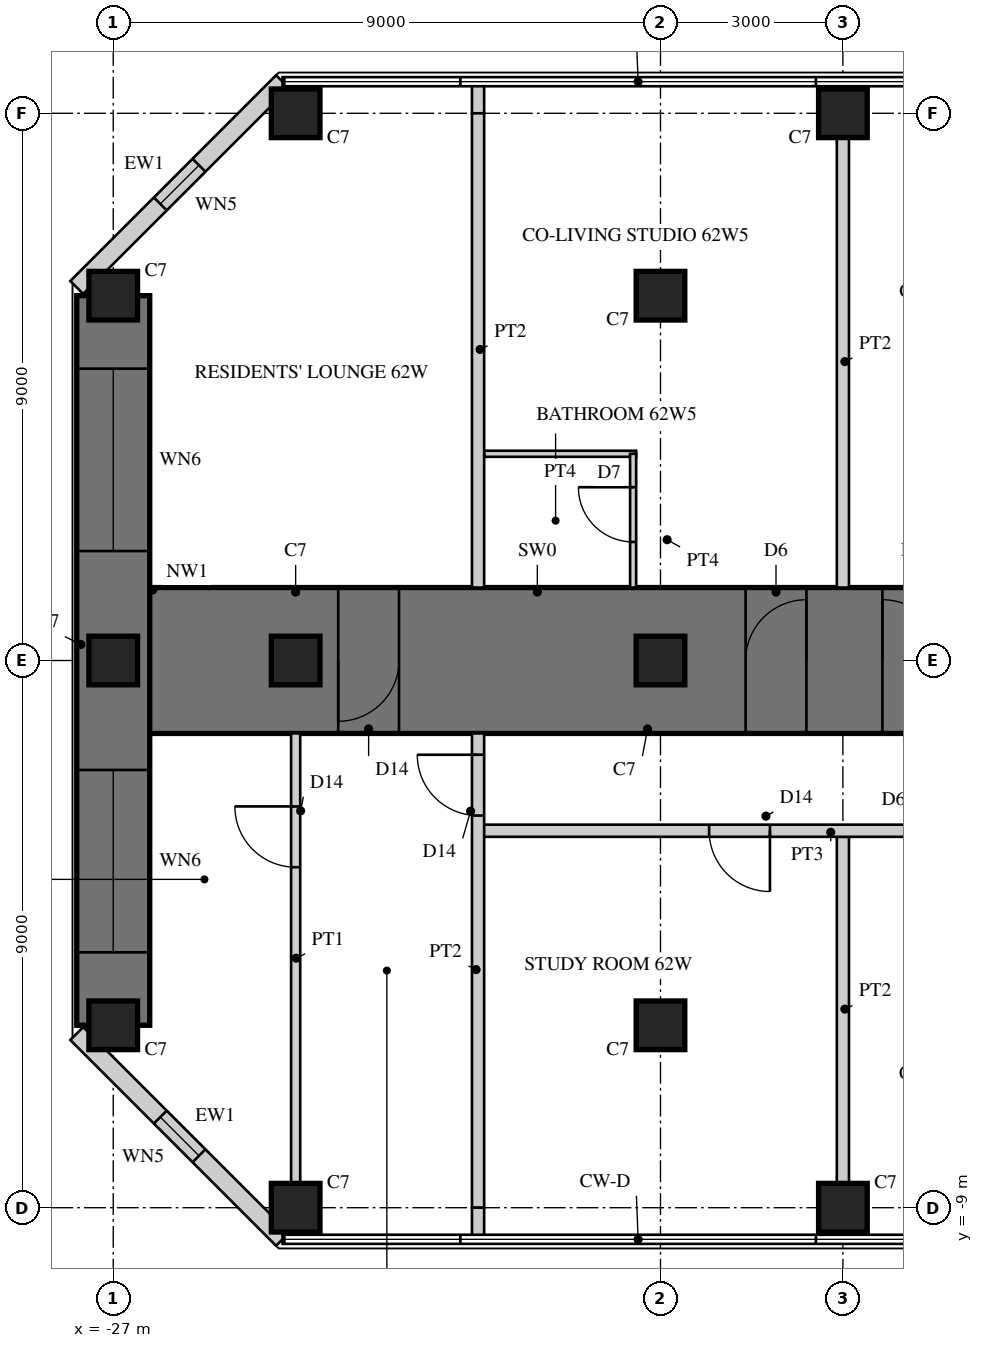
"""IFC4 building model, lengths in metres.
Left out: names, types, materials, properties, quantities, classifications, styles, units other than length and angle.
Written with IfcOpenShell. Run it as: python <this file> out.ifc"""

import sys

from ifc_helpers import new_model, si_unit, direction, frame, frame_2d, origin, origin_2d, place, context, subcontext, project, spatial, rectangle, hollow_rectangle, extrude, element, fill, save


model = new_model("IFC4")
c1 = context("Model", 3, precision=1e-05, world=origin(), true_north=direction((0.0, 1.0)))
c2 = subcontext(c1, "Body", "Model", "MODEL_VIEW")
j1 = project(units=[si_unit("LENGTHUNIT", "METRE"), si_unit("PLANEANGLEUNIT", "RADIAN")], contexts=[c1])
p1 = place(None, origin())
s1 = spatial("IfcSite", under=j1, at=p1, CompositionType="ELEMENT")
p2 = place(p1, origin())
s2 = spatial("IfcBuilding", under=s1, at=p2, CompositionType="ELEMENT")
p3 = place(p2, frame((0.0, 0.0, 242.5)))
s3 = spatial("IfcBuildingStorey", under=s2, at=p3, CompositionType="ELEMENT", Elevation=242.5)
p4 = place(p3, frame((-13.05, 0.0, 0.0), z_axis=(0.0, 0.0, 1.0), x_axis=(-1.0, 0.0, 0.0)))
e1 = element("IfcWall", 1, at=p4, inside=s3, PredefinedType="SHEAR", context=c2, shape_type="SweptSolid", body=[
    extrude(rectangle(XDim=13.95, YDim=2.4, at=frame_2d((6.975, 0.0))), origin(), (0.0, 0.0, 1.0), 3.4),
])
p5 = place(p4, frame((0.3, 0.0, 0.0)))
e2 = element("IfcOpeningElement", 2, at=p5, cuts=e1, PredefinedType="OPENING", context=c2, shape_type="SweptSolid", body=[
    extrude(rectangle(XDim=1.0, YDim=2.15, at=frame_2d((0.5, 1.075))), frame((0.0, 1.21, 0.0), z_axis=(0.0, -1.0, 0.0), x_axis=(1.0, 0.0, 0.0)), (0.0, 0.0, 1.0), 2.42),
])
p6 = place(p4, frame((2.55, 0.0, 0.0)))
e3 = element("IfcOpeningElement", 3, at=p6, cuts=e1, PredefinedType="OPENING", context=c2, shape_type="SweptSolid", body=[
    extrude(rectangle(XDim=1.0, YDim=2.15, at=frame_2d((0.5, 1.075))), frame((0.0, 1.21, 0.0), z_axis=(0.0, -1.0, 0.0), x_axis=(1.0, 0.0, 0.0)), (0.0, 0.0, 1.0), 2.42),
])
p7 = place(p4, frame((9.25, 0.0, 0.0)))
e4 = element("IfcOpeningElement", 4, at=p7, cuts=e1, PredefinedType="OPENING", context=c2, shape_type="SweptSolid", body=[
    extrude(rectangle(XDim=1.0, YDim=2.2, at=frame_2d((0.5, 1.1))), frame((0.0, 1.21, 0.0), z_axis=(0.0, -1.0, 0.0), x_axis=(1.0, 0.0, 0.0)), (0.0, 0.0, 1.0), 2.42),
])
p8 = place(p3, frame((-27.0, 6.0, 0.0), z_axis=(0.0, 0.0, 1.0), x_axis=(0.0, -1.0, 0.0)))
e5 = element("IfcWall", 5, at=p8, inside=s3, PredefinedType="SHEAR", context=c2, shape_type="SweptSolid", body=[
    extrude(rectangle(XDim=12.0, YDim=1.2, at=frame_2d((6.0, 0.0))), origin(), (0.0, 0.0, 1.0), 3.4),
])
p9 = place(p8, frame((1.2, 0.0, 0.6)))
e6 = element("IfcOpeningElement", 6, at=p9, cuts=e5, PredefinedType="OPENING", context=c2, shape_type="SweptSolid", body=[
    extrude(rectangle(XDim=3.0, YDim=2.4, at=frame_2d((1.5, 1.2))), frame((0.0, 0.61, 0.0), z_axis=(0.0, -1.0, 0.0), x_axis=(1.0, 0.0, 0.0)), (0.0, 0.0, 1.0), 1.22),
])
p10 = place(p8, frame((7.8, 0.0, 0.6)))
e7 = element("IfcOpeningElement", 7, at=p10, cuts=e5, PredefinedType="OPENING", context=c2, shape_type="SweptSolid", body=[
    extrude(rectangle(XDim=3.0, YDim=2.4, at=frame_2d((1.5, 1.2))), frame((0.0, 0.61, 0.0), z_axis=(0.0, -1.0, 0.0), x_axis=(1.0, 0.0, 0.0)), (0.0, 0.0, 1.0), 1.22),
])
for number, where, z_axis, x_axis in (
    (8, (-15.0, 9.0, 0.0), (0.0, 0.0, 1.0), (1.0, 0.0, 0.0)),
    (9, (-24.0, 9.0, 0.0), (0.0, 0.0, 1.0), (1.0, 0.0, 0.0)),
    (10, (-15.0, -9.0, 0.0), (0.0, 0.0, 1.0), (1.0, 0.0, 0.0)),
    (11, (-24.0, -9.0, 0.0), (0.0, 0.0, 1.0), (1.0, 0.0, 0.0)),
    (12, (-27.0, 6.0, 0.0), (0.0, 0.0, 1.0), (1.0, 0.0, 0.0)),
    (13, (-27.0, 0.0, 0.0), (0.0, 0.0, 1.0), (1.0, 0.0, 0.0)),
    (14, (-27.0, -6.0, 0.0), (0.0, 0.0, 1.0), (1.0, 0.0, 0.0)),
    (15, (-18.0, 6.0, 0.0), (0.0, 0.0, 1.0), (1.0, 0.0, 0.0)),
    (16, (-18.0, 0.0, 0.0), (0.0, 0.0, 1.0), (1.0, 0.0, 0.0)),
    (17, (-18.0, -6.0, 0.0), (0.0, 0.0, 1.0), (1.0, 0.0, 0.0)),
    (18, (-24.0, 0.0, 0.0), (0.0, 0.0, 1.0), (1.0, 0.0, 0.0)),
):
    element("IfcColumn", number, at=place(p3, frame(where, z_axis=z_axis, x_axis=x_axis)), inside=s3, PredefinedType="COLUMN", context=c2, shape_type="SweptSolid", body=[
        extrude(rectangle(XDim=0.8, YDim=0.8, at=origin_2d()), origin(), (0.0, 0.0, 1.0), 3.4),
    ])
p11 = place(p3, frame((-24.215, 9.52, 0.0), z_axis=(0.0, 0.0, 1.0), x_axis=(-0.707132283189, -0.707081278264, 0.0)))
e19 = element("IfcWall", 19, at=p11, inside=s3, PredefinedType="SOLIDWALL", context=c2, shape_type="SweptSolid", body=[
    extrude(rectangle(XDim=4.787, YDim=0.3, at=frame_2d((2.393, 0.0))), origin(), (0.0, 0.0, 1.0), 3.22),
])
p12 = place(p11, frame((1.943, 0.0, 0.3)))
e20 = element("IfcOpeningElement", 20, at=p12, cuts=e19, PredefinedType="OPENING", context=c2, shape_type="SweptSolid", body=[
    extrude(rectangle(XDim=0.9, YDim=2.4, at=frame_2d((0.45, 1.2))), frame((0.0, 0.16, 0.0), z_axis=(0.0, -1.0, 0.0), x_axis=(1.0, 0.0, 0.0)), (0.0, 0.0, 1.0), 0.32),
])
p13 = place(p3, frame((-27.6, -6.135, 0.0), z_axis=(0.0, 0.0, 1.0), x_axis=(0.707132283189, -0.707081278264, 0.0)))
e21 = element("IfcWall", 21, at=p13, inside=s3, PredefinedType="SOLIDWALL", context=c2, shape_type="SweptSolid", body=[
    extrude(rectangle(XDim=4.787, YDim=0.3, at=frame_2d((2.393, 0.0))), origin(), (0.0, 0.0, 1.0), 3.22),
])
p14 = place(p13, frame((1.943, 0.0, 0.3)))
e22 = element("IfcOpeningElement", 22, at=p14, cuts=e21, PredefinedType="OPENING", context=c2, shape_type="SweptSolid", body=[
    extrude(rectangle(XDim=0.9, YDim=2.4, at=frame_2d((0.45, 1.2))), frame((0.0, 0.16, 0.0), z_axis=(0.0, -1.0, 0.0), x_axis=(1.0, 0.0, 0.0)), (0.0, 0.0, 1.0), 0.32),
])
p15 = place(p3, frame((-15.0, -2.9, 0.0), z_axis=(0.0, 0.0, 1.0), x_axis=(0.0, -1.0, 0.0)))
e23 = element("IfcWall", 23, at=p15, inside=s3, PredefinedType="SOLIDWALL", context=c2, shape_type="SweptSolid", body=[
    extrude(rectangle(XDim=5.7, YDim=0.2, at=frame_2d((2.85, 0.0))), origin(), (0.0, 0.0, 1.0), 2.52),
])
p16 = place(p3, frame((-15.0, 8.6, 0.0), z_axis=(0.0, 0.0, 1.0), x_axis=(0.0, -1.0, 0.0)))
e24 = element("IfcWall", 24, at=p16, inside=s3, PredefinedType="SOLIDWALL", context=c2, shape_type="SweptSolid", body=[
    extrude(rectangle(XDim=7.4, YDim=0.2, at=frame_2d((3.7, 0.0))), origin(), (0.0, 0.0, 1.0), 2.52),
])
p17 = place(p3, frame((-18.4, 3.4, 0.0), z_axis=(0.0, 0.0, 1.0), x_axis=(-1.0, 0.0, 0.0)))
e25 = element("IfcWall", 25, at=p17, inside=s3, PredefinedType="PARTITIONING", context=c2, shape_type="SweptSolid", body=[
    extrude(rectangle(XDim=2.5, YDim=0.1, at=frame_2d((1.25, 0.0))), origin(), (0.0, 0.0, 1.0), 3.22),
])
p18 = place(p3, frame((-18.45, 3.4, 0.0), z_axis=(0.0, 0.0, 1.0), x_axis=(0.0, -1.0, 0.0)))
e26 = element("IfcWall", 26, at=p18, inside=s3, PredefinedType="PARTITIONING", context=c2, shape_type="SweptSolid", body=[
    extrude(rectangle(XDim=2.2, YDim=0.1, at=frame_2d((1.1, 0.0))), origin(), (0.0, 0.0, 1.0), 3.22),
])
p19 = place(p18, frame((0.55, 0.0, 0.0)))
e27 = element("IfcOpeningElement", 27, at=p19, cuts=e26, PredefinedType="OPENING", context=c2, shape_type="SweptSolid", body=[
    extrude(rectangle(XDim=0.9, YDim=2.1, at=frame_2d((0.45, 1.05))), frame((0.0, 0.06, 0.0), z_axis=(0.0, -1.0, 0.0), x_axis=(1.0, 0.0, 0.0)), (0.0, 0.0, 1.0), 0.12),
])
p20 = place(p3, frame((-9.4, -2.8, 0.0), z_axis=(0.0, 0.0, 1.0), x_axis=(-1.0, 0.0, 0.0)))
e28 = element("IfcWall", 28, at=p20, inside=s3, PredefinedType="SOLIDWALL", context=c2, shape_type="SweptSolid", body=[
    extrude(rectangle(XDim=11.6, YDim=0.2, at=frame_2d((5.8, 0.0))), origin(), (0.0, 0.0, 1.0), 3.22),
])
p21 = place(p20, frame((3.4, 0.0, 0.0)))
e29 = element("IfcOpeningElement", 29, at=p21, cuts=e28, PredefinedType="OPENING", context=c2, shape_type="SweptSolid", body=[
    extrude(rectangle(XDim=1.0, YDim=2.15, at=frame_2d((0.5, 1.075))), frame((0.0, 0.11, 0.0), z_axis=(0.0, -1.0, 0.0), x_axis=(1.0, 0.0, 0.0)), (0.0, 0.0, 1.0), 0.22),
])
p22 = place(p20, frame((6.8, 0.0, 0.0)))
e30 = element("IfcOpeningElement", 30, at=p22, cuts=e28, PredefinedType="OPENING", context=c2, shape_type="SweptSolid", body=[
    extrude(rectangle(XDim=1.0, YDim=2.2, at=frame_2d((0.5, 1.1))), frame((0.0, 0.11, 0.0), z_axis=(0.0, -1.0, 0.0), x_axis=(1.0, 0.0, 0.0)), (0.0, 0.0, 1.0), 0.22),
])
p23 = place(p3, frame((-24.0, -1.2, 0.0), z_axis=(0.0, 0.0, 1.0), x_axis=(0.0, -1.0, 0.0)))
e31 = element("IfcWall", 31, at=p23, inside=s3, PredefinedType="PARTITIONING", context=c2, shape_type="SweptSolid", body=[
    extrude(rectangle(XDim=7.4, YDim=0.15, at=frame_2d((3.7, 0.0))), origin(), (0.0, 0.0, 1.0), 2.52),
])
p24 = place(p23, frame((1.2, 0.0, 0.0)))
e32 = element("IfcOpeningElement", 32, at=p24, cuts=e31, PredefinedType="OPENING", context=c2, shape_type="SweptSolid", body=[
    extrude(rectangle(XDim=1.0, YDim=2.2, at=frame_2d((0.5, 1.1))), frame((0.0, 0.085, 0.0), z_axis=(0.0, -1.0, 0.0), x_axis=(1.0, 0.0, 0.0)), (0.0, 0.0, 1.0), 0.17),
])
p25 = place(p3, frame((-21.0, 9.48, 0.0), z_axis=(0.0, 0.0, 1.0), x_axis=(0.0, -1.0, 0.0)))
e33 = element("IfcWall", 33, at=p25, inside=s3, PredefinedType="SOLIDWALL", context=c2, shape_type="SweptSolid", body=[
    extrude(rectangle(XDim=0.48, YDim=0.2, at=frame_2d((0.24, 0.0))), origin(), (0.0, 0.0, 1.0), 3.22),
])
p26 = place(p3, frame((-21.0, 9.0, 0.0), z_axis=(0.0, 0.0, 1.0), x_axis=(0.0, -1.0, 0.0)))
e34 = element("IfcWall", 34, at=p26, inside=s3, PredefinedType="SOLIDWALL", context=c2, shape_type="SweptSolid", body=[
    extrude(rectangle(XDim=7.8, YDim=0.2, at=frame_2d((3.9, 0.0))), origin(), (0.0, 0.0, 1.0), 2.67),
])
p27 = place(p3, frame((-21.0, -1.2, 0.0), z_axis=(0.0, 0.0, 1.0), x_axis=(0.0, -1.0, 0.0)))
e35 = element("IfcWall", 35, at=p27, inside=s3, PredefinedType="SOLIDWALL", context=c2, shape_type="SweptSolid", body=[
    extrude(rectangle(XDim=7.8, YDim=0.2, at=frame_2d((3.9, 0.0))), origin(), (0.0, 0.0, 1.0), 2.67),
])
p28 = place(p27, frame((0.35, 0.0, 0.0)))
e36 = element("IfcOpeningElement", 36, at=p28, cuts=e35, PredefinedType="OPENING", context=c2, shape_type="SweptSolid", body=[
    extrude(rectangle(XDim=1.0, YDim=2.2, at=frame_2d((0.5, 1.1))), frame((0.0, 0.11, 0.0), z_axis=(0.0, -1.0, 0.0), x_axis=(1.0, 0.0, 0.0)), (0.0, 0.0, 1.0), 0.22),
])
p29 = place(p3, frame((-21.0, -9.0, 0.0), z_axis=(0.0, 0.0, 1.0), x_axis=(0.0, -1.0, 0.0)))
e37 = element("IfcWall", 37, at=p29, inside=s3, PredefinedType="SOLIDWALL", context=c2, shape_type="SweptSolid", body=[
    extrude(rectangle(XDim=0.48, YDim=0.2, at=frame_2d((0.24, 0.0))), origin(), (0.0, 0.0, 1.0), 3.22),
])
p30 = place(p12, origin())
e38 = element("IfcWindow", 38, at=p30, inside=s3, PartitioningType="SINGLE_PANEL", PredefinedType="WINDOW", context=c2, shape_type="SweptSolid", body=[
    extrude(hollow_rectangle(XDim=0.9, YDim=2.4, WallThickness=0.06, at=frame_2d((0.45, 1.2))), frame((0.0, 0.03, 0.0), z_axis=(0.0, -1.0, 0.0), x_axis=(1.0, 0.0, 0.0)), (0.0, 0.0, 1.0), 0.06),
    extrude(rectangle(XDim=0.779, YDim=2.279, at=frame_2d((0.45, 1.2))), frame((0.0, 0.03, 0.0), z_axis=(0.0, -1.0, 0.0), x_axis=(1.0, 0.0, 0.0)), (0.0, 0.0, 1.0), 0.06),
])
fill(e20, e38)
p31 = place(p9, origin())
e39 = element("IfcWindow", 39, at=p31, inside=s3, PartitioningType="SINGLE_PANEL", PredefinedType="WINDOW", context=c2, shape_type="SweptSolid", body=[
    extrude(hollow_rectangle(XDim=3.0, YDim=2.4, WallThickness=0.06, at=frame_2d((1.5, 1.2))), frame((0.0, 0.03, 0.0), z_axis=(0.0, -1.0, 0.0), x_axis=(1.0, 0.0, 0.0)), (0.0, 0.0, 1.0), 0.06),
    extrude(rectangle(XDim=2.879, YDim=2.279, at=frame_2d((1.5, 1.2))), frame((0.0, 0.03, 0.0), z_axis=(0.0, -1.0, 0.0), x_axis=(1.0, 0.0, 0.0)), (0.0, 0.0, 1.0), 0.06),
])
fill(e6, e39)
p32 = place(p10, origin())
e40 = element("IfcWindow", 40, at=p32, inside=s3, PartitioningType="SINGLE_PANEL", PredefinedType="WINDOW", context=c2, shape_type="SweptSolid", body=[
    extrude(hollow_rectangle(XDim=3.0, YDim=2.4, WallThickness=0.06, at=frame_2d((1.5, 1.2))), frame((0.0, 0.03, 0.0), z_axis=(0.0, -1.0, 0.0), x_axis=(1.0, 0.0, 0.0)), (0.0, 0.0, 1.0), 0.06),
    extrude(rectangle(XDim=2.879, YDim=2.279, at=frame_2d((1.5, 1.2))), frame((0.0, 0.03, 0.0), z_axis=(0.0, -1.0, 0.0), x_axis=(1.0, 0.0, 0.0)), (0.0, 0.0, 1.0), 0.06),
])
fill(e7, e40)
p33 = place(p14, origin())
e41 = element("IfcWindow", 41, at=p33, inside=s3, PartitioningType="SINGLE_PANEL", PredefinedType="WINDOW", context=c2, shape_type="SweptSolid", body=[
    extrude(hollow_rectangle(XDim=0.9, YDim=2.4, WallThickness=0.06, at=frame_2d((0.45, 1.2))), frame((0.0, 0.03, 0.0), z_axis=(0.0, -1.0, 0.0), x_axis=(1.0, 0.0, 0.0)), (0.0, 0.0, 1.0), 0.06),
    extrude(rectangle(XDim=0.779, YDim=2.279, at=frame_2d((0.45, 1.2))), frame((0.0, 0.03, 0.0), z_axis=(0.0, -1.0, 0.0), x_axis=(1.0, 0.0, 0.0)), (0.0, 0.0, 1.0), 0.06),
])
fill(e22, e41)
p34 = place(p19, frame((0.9, 0.0, 0.0), z_axis=(0.0, 0.0, 1.0), x_axis=(-1.0, 0.0, 0.0)))
e42 = element("IfcDoor", 42, at=p34, inside=s3, OperationType="SINGLE_SWING_RIGHT", PredefinedType="DOOR", context=c2, shape_type="SweptSolid", body=[
    extrude(rectangle(XDim=0.9, YDim=2.1, at=frame_2d((0.45, 1.05))), frame((0.0, 0.025, 0.0), z_axis=(0.0, -1.0, 0.0), x_axis=(1.0, 0.0, 0.0)), (0.0, 0.0, 1.0), 0.05),
])
fill(e27, e42)
p35 = place(p22, origin())
e43 = element("IfcDoor", 43, at=p35, inside=s3, OperationType="SINGLE_SWING_LEFT", PredefinedType="DOOR", context=c2, shape_type="SweptSolid", body=[
    extrude(rectangle(XDim=1.0, YDim=2.2, at=frame_2d((0.5, 1.1))), frame((0.0, 0.025, 0.0), z_axis=(0.0, -1.0, 0.0), x_axis=(1.0, 0.0, 0.0)), (0.0, 0.0, 1.0), 0.05),
])
fill(e30, e43)
p36 = place(p24, frame((1.0, 0.0, 0.0), z_axis=(0.0, 0.0, 1.0), x_axis=(-1.0, 0.0, 0.0)))
e44 = element("IfcDoor", 44, at=p36, inside=s3, OperationType="SINGLE_SWING_RIGHT", PredefinedType="DOOR", context=c2, shape_type="SweptSolid", body=[
    extrude(rectangle(XDim=1.0, YDim=2.2, at=frame_2d((0.5, 1.1))), frame((0.0, 0.025, 0.0), z_axis=(0.0, -1.0, 0.0), x_axis=(1.0, 0.0, 0.0)), (0.0, 0.0, 1.0), 0.05),
])
fill(e32, e44)
p37 = place(p28, frame((1.0, 0.0, 0.0), z_axis=(0.0, 0.0, 1.0), x_axis=(-1.0, 0.0, 0.0)))
e45 = element("IfcDoor", 45, at=p37, inside=s3, OperationType="SINGLE_SWING_RIGHT", PredefinedType="DOOR", context=c2, shape_type="SweptSolid", body=[
    extrude(rectangle(XDim=1.0, YDim=2.2, at=frame_2d((0.5, 1.1))), frame((0.0, 0.025, 0.0), z_axis=(0.0, -1.0, 0.0), x_axis=(1.0, 0.0, 0.0)), (0.0, 0.0, 1.0), 0.05),
])
fill(e36, e45)
p38 = place(p5, frame((1.0, 0.0, 0.0), z_axis=(0.0, 0.0, 1.0), x_axis=(-1.0, 0.0, 0.0)))
e46 = element("IfcDoor", 46, at=p38, inside=s3, OperationType="SINGLE_SWING_LEFT", PredefinedType="DOOR", context=c2, shape_type="SweptSolid", body=[
    extrude(rectangle(XDim=1.0, YDim=2.15, at=frame_2d((0.5, 1.075))), frame((0.0, 0.025, 0.0), z_axis=(0.0, -1.0, 0.0), x_axis=(1.0, 0.0, 0.0)), (0.0, 0.0, 1.0), 0.05),
])
fill(e2, e46)
p39 = place(p6, frame((1.0, 0.0, 0.0), z_axis=(0.0, 0.0, 1.0), x_axis=(-1.0, 0.0, 0.0)))
e47 = element("IfcDoor", 47, at=p39, inside=s3, OperationType="SINGLE_SWING_RIGHT", PredefinedType="DOOR", context=c2, shape_type="SweptSolid", body=[
    extrude(rectangle(XDim=1.0, YDim=2.15, at=frame_2d((0.5, 1.075))), frame((0.0, 0.025, 0.0), z_axis=(0.0, -1.0, 0.0), x_axis=(1.0, 0.0, 0.0)), (0.0, 0.0, 1.0), 0.05),
])
fill(e3, e47)
p40 = place(p7, origin())
e48 = element("IfcDoor", 48, at=p40, inside=s3, OperationType="SINGLE_SWING_RIGHT", PredefinedType="DOOR", context=c2, shape_type="SweptSolid", body=[
    extrude(rectangle(XDim=1.0, YDim=2.2, at=frame_2d((0.5, 1.1))), frame((0.0, 0.025, 0.0), z_axis=(0.0, -1.0, 0.0), x_axis=(1.0, 0.0, 0.0)), (0.0, 0.0, 1.0), 0.05),
])
fill(e4, e48)
save(model, sys.argv[1])
